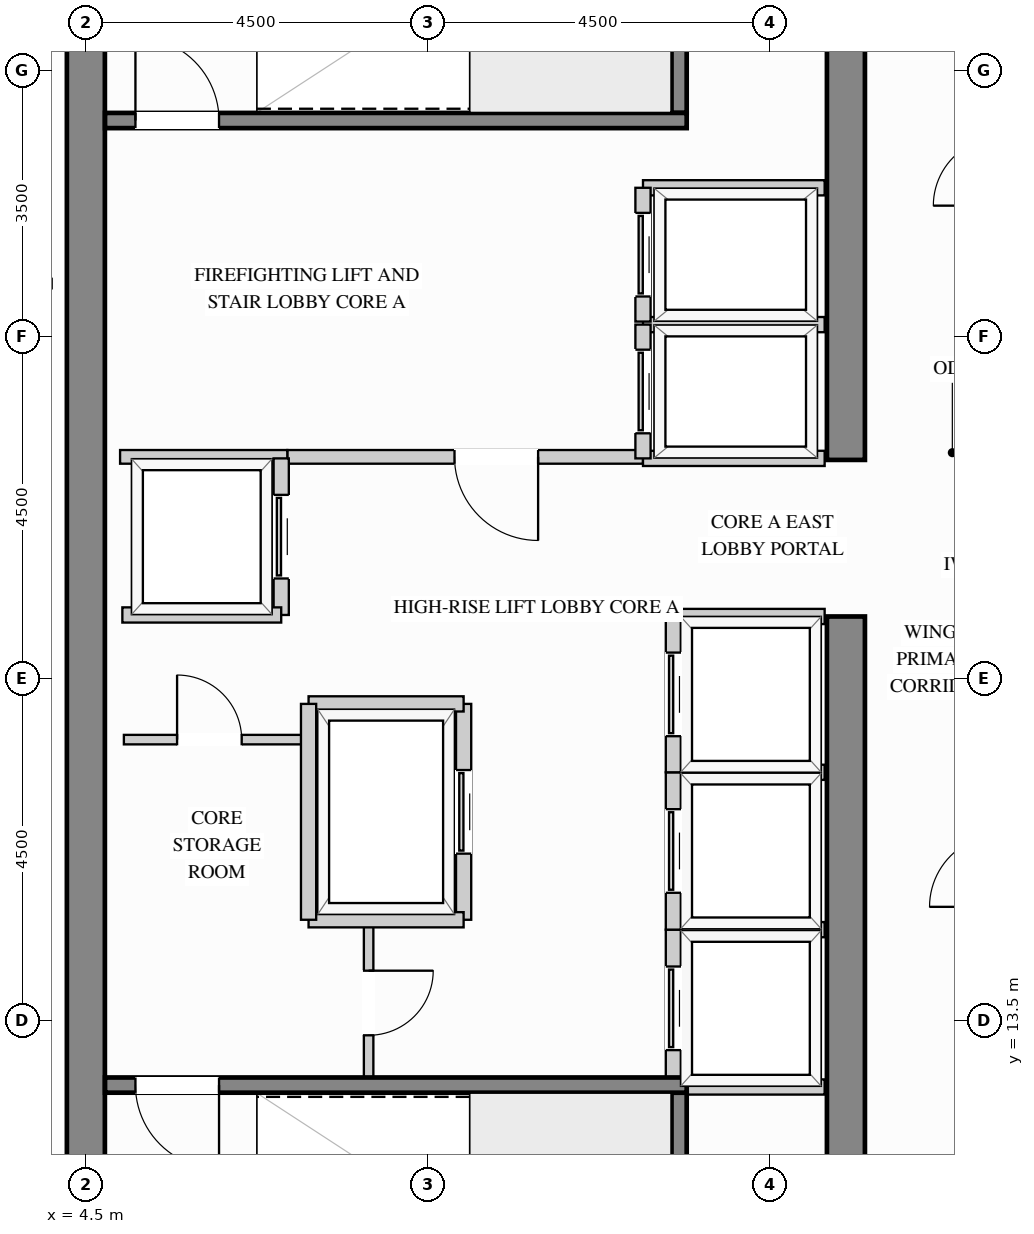
"""IFC4 building model, lengths in metres.
Left out: names, types, materials, properties, quantities, classifications, styles, units other than length and angle.
Written with IfcOpenShell. Run it as: python <this file> out.ifc"""

import sys

from ifc_helpers import new_model, si_unit, direction, frame, frame_2d, origin, place, context, subcontext, project, spatial, rectangle, extrude, source, transform, mapped, element, fill, save


model = new_model("IFC4")
c1 = context("Model", 3, precision=1e-05, world=origin(), true_north=direction((0.0, 1.0)))
c2 = subcontext(c1, "Body", "Model", "MODEL_VIEW")
j1 = project(units=[si_unit("LENGTHUNIT", "METRE"), si_unit("PLANEANGLEUNIT", "RADIAN")], contexts=[c1])
p1 = place(None, origin())
s1 = spatial("IfcSite", under=j1, at=p1, CompositionType="ELEMENT")
p2 = place(p1, origin())
s2 = spatial("IfcBuilding", under=s1, at=p2, CompositionType="ELEMENT")
p3 = place(p2, frame((0.0, 0.0, 226.8)))
s3 = spatial("IfcBuildingStorey", under=s2, at=p3, CompositionType="ELEMENT", Elevation=226.8)
m1 = source(origin(), c2, "Body", "SweptSolid", [
    extrude(rectangle(XDim=10.07, YDim=0.5, at=frame_2d((5.035, 0.0))), origin(), (0.0, 0.0, 1.0), 3.4),
])
p4 = place(p3, frame((14.5, 8.75, 0.0), z_axis=(0.0, 0.0, 1.0), x_axis=(0.0, 1.0, 0.0)))
e1 = element("IfcWall", 1, at=p4, inside=s3, PredefinedType="SHEAR", context=c2, shape_type="MappedRepresentation", body=[
    mapped(m1, transform((0.0, 0.0, 0.0), x_axis=(1.0, 0.0, 0.0), y_axis=(0.0, 1.0, 0.0), z_axis=(0.0, 0.0, 1.0))),
])
m2 = source(origin(), c2, "Body", "SweptSolid", [
    extrude(rectangle(XDim=8.37, YDim=0.5, at=frame_2d((4.185, 0.0))), origin(), (0.0, 0.0, 1.0), 3.4),
])
p5 = place(p3, frame((14.5, 20.88, 0.0), z_axis=(0.0, 0.0, 1.0), x_axis=(0.0, 1.0, 0.0)))
e2 = element("IfcWall", 2, at=p5, inside=s3, PredefinedType="SHEAR", context=c2, shape_type="MappedRepresentation", body=[
    mapped(m2, transform((0.0, 0.0, 0.0), x_axis=(1.0, 0.0, 0.0), y_axis=(0.0, 1.0, 0.0), z_axis=(0.0, 0.0, 1.0))),
])
m3 = source(origin(), c2, "Body", "SweptSolid", [
    extrude(rectangle(XDim=20.5, YDim=0.5, at=frame_2d((10.25, 0.0))), origin(), (0.0, 0.0, 1.0), 3.4),
])
p6 = place(p3, frame((4.5, 8.75, 0.0), z_axis=(0.0, 0.0, 1.0), x_axis=(0.0, 1.0, 0.0)))
e3 = element("IfcWall", 3, at=p6, inside=s3, PredefinedType="SHEAR", context=c2, shape_type="MappedRepresentation", body=[
    mapped(m3, transform((0.0, 0.0, 0.0), x_axis=(1.0, 0.0, 0.0), y_axis=(0.0, 1.0, 0.0), z_axis=(0.0, 0.0, 1.0))),
])
p7 = place(p3, frame((7.15, 20.92, 0.0), z_axis=(0.0, 0.0, 1.0), x_axis=(1.0, 0.0, 0.0)))
e4 = element("IfcWall", 4, at=p7, inside=s3, PredefinedType="PARTITIONING", context=c2, shape_type="SweptSolid", body=[
    extrude(rectangle(XDim=4.68, YDim=0.18, at=frame_2d((2.34, 0.0))), origin(), (0.0, 0.0, 1.0), 3.385),
])
p8 = place(p7, frame((2.2, 0.0, 0.0)))
e5 = element("IfcOpeningElement", 5, at=p8, cuts=e4, PredefinedType="OPENING", context=c2, shape_type="SweptSolid", body=[
    extrude(rectangle(XDim=1.1, YDim=2.15, at=frame_2d((0.55, 1.075))), frame((0.0, 0.1, 0.0), z_axis=(0.0, -1.0, 0.0), x_axis=(1.0, 0.0, 0.0)), (0.0, 0.0, 1.0), 0.2),
])
m4 = source(origin(), c2, "Body", "SweptSolid", [
    extrude(rectangle(XDim=2.2, YDim=0.18, at=frame_2d((1.1, 0.0))), origin(), (0.0, 0.0, 1.0), 3.385),
])
p9 = place(p3, frame((4.95, 20.92, 0.0), z_axis=(0.0, 0.0, 1.0), x_axis=(1.0, 0.0, 0.0)))
e6 = element("IfcWall", 6, at=p9, inside=s3, PredefinedType="PARTITIONING", context=c2, shape_type="MappedRepresentation", body=[
    mapped(m4, transform((0.0, 0.0, 0.0), x_axis=(1.0, 0.0, 0.0), y_axis=(0.0, 1.0, 0.0), z_axis=(0.0, 0.0, 1.0))),
])
p10 = place(p3, frame((8.22, 12.75, 0.0), z_axis=(0.0, 0.0, 1.0), x_axis=(0.0, 1.0, 0.0)))
e7 = element("IfcWall", 7, at=p10, inside=s3, PredefinedType="PARTITIONING", context=c2, shape_type="SweptSolid", body=[
    extrude(rectangle(XDim=2.07, YDim=0.125, at=frame_2d((1.035, 0.0))), origin(), (0.0, 0.0, 1.0), 3.385),
])
p11 = place(p10, frame((0.56, 0.0, 0.0)))
e8 = element("IfcOpeningElement", 8, at=p11, cuts=e7, PredefinedType="OPENING", context=c2, shape_type="SweptSolid", body=[
    extrude(rectangle(XDim=0.85, YDim=2.1, at=frame_2d((0.425, 1.05))), frame((0.0, 0.073, 0.0), z_axis=(0.0, -1.0, 0.0), x_axis=(1.0, 0.0, 0.0)), (0.0, 0.0, 1.0), 0.145),
])
p12 = place(p3, frame((5.0, 17.2, 0.0), z_axis=(0.0, 0.0, 1.0), x_axis=(1.0, 0.0, 0.0)))
e9 = element("IfcWall", 9, at=p12, inside=s3, PredefinedType="PARTITIONING", context=c2, shape_type="SweptSolid", body=[
    extrude(rectangle(XDim=2.4, YDim=0.125, at=frame_2d((1.2, 0.0))), origin(), (0.0, 0.0, 1.0), 3.385),
])
p13 = place(p12, frame((0.7, 0.0, 0.0)))
e10 = element("IfcOpeningElement", 10, at=p13, cuts=e9, PredefinedType="OPENING", context=c2, shape_type="SweptSolid", body=[
    extrude(rectangle(XDim=0.85, YDim=2.1, at=frame_2d((0.425, 1.05))), frame((0.0, 0.073, 0.0), z_axis=(0.0, -1.0, 0.0), x_axis=(1.0, 0.0, 0.0)), (0.0, 0.0, 1.0), 0.145),
])
m5 = source(origin(), c2, "Body", "SweptSolid", [
    extrude(rectangle(XDim=3.698, YDim=0.125, at=frame_2d((1.849, 0.0))), origin(), (0.0, 0.0, 1.0), 3.385),
])
p14 = place(p3, frame((0.352, 23.2, 0.0), z_axis=(0.0, 0.0, 1.0), x_axis=(1.0, 0.0, 0.0)))
e11 = element("IfcWall", 11, at=p14, inside=s3, PredefinedType="PARTITIONING", context=c2, shape_type="MappedRepresentation", body=[
    mapped(m5, transform((0.0, 0.0, 0.0), x_axis=(1.0, 0.0, 0.0), y_axis=(0.0, 1.0, 0.0), z_axis=(0.0, 0.0, 1.0))),
])
m6 = source(origin(), c2, "Body", "SweptSolid", [
    extrude(rectangle(XDim=2.39, YDim=0.2, at=frame_2d((1.195, 0.0))), origin(), (0.0, 0.0, 1.0), 3.385),
])
for number, where, z_axis, x_axis in (
    (12, (11.83, 22.66, 0.0), (0.0, 0.0, 1.0), (1.0, 0.0, 0.0)),
    (13, (11.83, 20.9, 0.0), (0.0, 0.0, 1.0), (1.0, 0.0, 0.0)),
):
    element("IfcWall", number, at=place(p3, frame(where, z_axis=z_axis, x_axis=x_axis)), inside=s3, PredefinedType="PARTITIONING", context=c2, shape_type="MappedRepresentation", body=[
        mapped(m6, transform((0.0, 0.0, 0.0), x_axis=(1.0, 0.0, 0.0), y_axis=(0.0, 1.0, 0.0), z_axis=(0.0, 0.0, 1.0))),
    ])
p15 = place(p3, frame((11.83, 20.9, 0.0), z_axis=(0.0, 0.0, 1.0), x_axis=(0.0, 1.0, 0.0)))
e14 = element("IfcWall", 14, at=p15, inside=s3, PredefinedType="PARTITIONING", context=c2, shape_type="SweptSolid", body=[
    extrude(rectangle(XDim=1.76, YDim=0.2, at=frame_2d((0.88, 0.0))), origin(), (0.0, 0.0, 1.0), 3.385),
])
p16 = place(p15, frame((0.33, 0.0, 0.0)))
e15 = element("IfcOpeningElement", 15, at=p16, cuts=e14, PredefinedType="OPENING", context=c2, shape_type="SweptSolid", body=[
    extrude(rectangle(XDim=1.1, YDim=2.2, at=frame_2d((0.55, 1.1))), frame((0.0, 0.11, 0.0), z_axis=(0.0, -1.0, 0.0), x_axis=(1.0, 0.0, 0.0)), (0.0, 0.0, 1.0), 0.22),
])
p17 = place(p3, frame((11.83, 24.46, 0.0), z_axis=(0.0, 0.0, 1.0), x_axis=(1.0, 0.0, 0.0)))
e16 = element("IfcWall", 16, at=p17, inside=s3, PredefinedType="PARTITIONING", context=c2, shape_type="MappedRepresentation", body=[
    mapped(m6, transform((0.0, 0.0, 0.0), x_axis=(1.0, 0.0, 0.0), y_axis=(0.0, 1.0, 0.0), z_axis=(0.0, 0.0, 1.0))),
])
p18 = place(p3, frame((11.83, 22.7, 0.0), z_axis=(0.0, 0.0, 1.0), x_axis=(0.0, 1.0, 0.0)))
e17 = element("IfcWall", 17, at=p18, inside=s3, PredefinedType="PARTITIONING", context=c2, shape_type="SweptSolid", body=[
    extrude(rectangle(XDim=1.76, YDim=0.2, at=frame_2d((0.88, 0.0))), origin(), (0.0, 0.0, 1.0), 3.385),
])
p19 = place(p18, frame((0.33, 0.0, 0.0)))
e18 = element("IfcOpeningElement", 18, at=p19, cuts=e17, PredefinedType="OPENING", context=c2, shape_type="SweptSolid", body=[
    extrude(rectangle(XDim=1.1, YDim=2.2, at=frame_2d((0.55, 1.1))), frame((0.0, 0.11, 0.0), z_axis=(0.0, -1.0, 0.0), x_axis=(1.0, 0.0, 0.0)), (0.0, 0.0, 1.0), 0.22),
])
m7 = source(origin(), c2, "Body", "SweptSolid", [
    extrude(rectangle(XDim=1.99, YDim=0.2, at=frame_2d((0.995, 0.0))), origin(), (0.0, 0.0, 1.0), 3.385),
])
for number, where, z_axis, x_axis in (
    (19, (12.23, 14.7, 0.0), (0.0, 0.0, 1.0), (1.0, 0.0, 0.0)),
    (20, (12.23, 12.63, 0.0), (0.0, 0.0, 1.0), (1.0, 0.0, 0.0)),
):
    element("IfcWall", number, at=place(p3, frame(where, z_axis=z_axis, x_axis=x_axis)), inside=s3, PredefinedType="PARTITIONING", context=c2, shape_type="MappedRepresentation", body=[
        mapped(m7, transform((0.0, 0.0, 0.0), x_axis=(1.0, 0.0, 0.0), y_axis=(0.0, 1.0, 0.0), z_axis=(0.0, 0.0, 1.0))),
    ])
p20 = place(p3, frame((12.23, 12.63, 0.0), z_axis=(0.0, 0.0, 1.0), x_axis=(0.0, 1.0, 0.0)))
e21 = element("IfcWall", 21, at=p20, inside=s3, PredefinedType="PARTITIONING", context=c2, shape_type="SweptSolid", body=[
    extrude(rectangle(XDim=2.07, YDim=0.2, at=frame_2d((1.035, 0.0))), origin(), (0.0, 0.0, 1.0), 3.385),
])
p21 = place(p20, frame((0.485, 0.0, 0.0)))
e22 = element("IfcOpeningElement", 22, at=p21, cuts=e21, PredefinedType="OPENING", context=c2, shape_type="SweptSolid", body=[
    extrude(rectangle(XDim=1.1, YDim=2.2, at=frame_2d((0.55, 1.1))), frame((0.0, 0.11, 0.0), z_axis=(0.0, -1.0, 0.0), x_axis=(1.0, 0.0, 0.0)), (0.0, 0.0, 1.0), 0.22),
])
p22 = place(p3, frame((12.23, 16.77, 0.0), z_axis=(0.0, 0.0, 1.0), x_axis=(1.0, 0.0, 0.0)))
e23 = element("IfcWall", 23, at=p22, inside=s3, PredefinedType="PARTITIONING", context=c2, shape_type="MappedRepresentation", body=[
    mapped(m7, transform((0.0, 0.0, 0.0), x_axis=(1.0, 0.0, 0.0), y_axis=(0.0, 1.0, 0.0), z_axis=(0.0, 0.0, 1.0))),
])
p23 = place(p3, frame((12.23, 14.7, 0.0), z_axis=(0.0, 0.0, 1.0), x_axis=(0.0, 1.0, 0.0)))
e24 = element("IfcWall", 24, at=p23, inside=s3, PredefinedType="PARTITIONING", context=c2, shape_type="SweptSolid", body=[
    extrude(rectangle(XDim=2.07, YDim=0.2, at=frame_2d((1.035, 0.0))), origin(), (0.0, 0.0, 1.0), 3.385),
])
p24 = place(p23, frame((0.485, 0.0, 0.0)))
e25 = element("IfcOpeningElement", 25, at=p24, cuts=e24, PredefinedType="OPENING", context=c2, shape_type="SweptSolid", body=[
    extrude(rectangle(XDim=1.1, YDim=2.2, at=frame_2d((0.55, 1.1))), frame((0.0, 0.11, 0.0), z_axis=(0.0, -1.0, 0.0), x_axis=(1.0, 0.0, 0.0)), (0.0, 0.0, 1.0), 0.22),
])
p25 = place(p3, frame((12.23, 18.82, 0.0), z_axis=(0.0, 0.0, 1.0), x_axis=(1.0, 0.0, 0.0)))
e26 = element("IfcWall", 26, at=p25, inside=s3, PredefinedType="PARTITIONING", context=c2, shape_type="MappedRepresentation", body=[
    mapped(m7, transform((0.0, 0.0, 0.0), x_axis=(1.0, 0.0, 0.0), y_axis=(0.0, 1.0, 0.0), z_axis=(0.0, 0.0, 1.0))),
])
p26 = place(p3, frame((12.23, 16.77, 0.0), z_axis=(0.0, 0.0, 1.0), x_axis=(0.0, 1.0, 0.0)))
e27 = element("IfcWall", 27, at=p26, inside=s3, PredefinedType="PARTITIONING", context=c2, shape_type="SweptSolid", body=[
    extrude(rectangle(XDim=2.05, YDim=0.2, at=frame_2d((1.025, 0.0))), origin(), (0.0, 0.0, 1.0), 3.385),
])
p27 = place(p26, frame((0.475, 0.0, 0.0)))
e28 = element("IfcOpeningElement", 28, at=p27, cuts=e27, PredefinedType="OPENING", context=c2, shape_type="SweptSolid", body=[
    extrude(rectangle(XDim=1.1, YDim=2.2, at=frame_2d((0.55, 1.1))), frame((0.0, 0.11, 0.0), z_axis=(0.0, -1.0, 0.0), x_axis=(1.0, 0.0, 0.0)), (0.0, 0.0, 1.0), 0.22),
])
p28 = place(p3, frame((7.07, 18.84, 0.0), z_axis=(0.0, 0.0, 1.0), x_axis=(0.0, 1.0, 0.0)))
e29 = element("IfcWall", 29, at=p28, inside=s3, PredefinedType="PARTITIONING", context=c2, shape_type="SweptSolid", body=[
    extrude(rectangle(XDim=2.06, YDim=0.2, at=frame_2d((1.03, 0.0))), origin(), (0.0, 0.0, 1.0), 3.385),
])
p29 = place(p28, frame((0.48, 0.0, 0.0)))
e30 = element("IfcOpeningElement", 30, at=p29, cuts=e29, PredefinedType="OPENING", context=c2, shape_type="SweptSolid", body=[
    extrude(rectangle(XDim=1.1, YDim=2.2, at=frame_2d((0.55, 1.1))), frame((0.0, 0.11, 0.0), z_axis=(0.0, -1.0, 0.0), x_axis=(1.0, 0.0, 0.0)), (0.0, 0.0, 1.0), 0.22),
])
m8 = source(origin(), c2, "Body", "SweptSolid", [
    extrude(rectangle(XDim=2.09, YDim=0.2, at=frame_2d((1.045, 0.0))), origin(), (0.0, 0.0, 1.0), 3.385),
])
p30 = place(p3, frame((4.98, 18.84, 0.0), z_axis=(0.0, 0.0, 1.0), x_axis=(1.0, 0.0, 0.0)))
e31 = element("IfcWall", 31, at=p30, inside=s3, PredefinedType="PARTITIONING", context=c2, shape_type="MappedRepresentation", body=[
    mapped(m8, transform((0.0, 0.0, 0.0), x_axis=(1.0, 0.0, 0.0), y_axis=(0.0, 1.0, 0.0), z_axis=(0.0, 0.0, 1.0))),
])
p31 = place(p3, frame((9.47, 14.83, 0.0), z_axis=(0.0, 0.0, 1.0), x_axis=(0.0, 1.0, 0.0)))
e32 = element("IfcWall", 32, at=p31, inside=s3, PredefinedType="PARTITIONING", context=c2, shape_type="SweptSolid", body=[
    extrude(rectangle(XDim=2.84, YDim=0.2, at=frame_2d((1.42, 0.0))), origin(), (0.0, 0.0, 1.0), 3.385),
])
p32 = place(p31, frame((0.87, 0.0, 0.0)))
e33 = element("IfcOpeningElement", 33, at=p32, cuts=e32, PredefinedType="OPENING", context=c2, shape_type="SweptSolid", body=[
    extrude(rectangle(XDim=1.1, YDim=2.2, at=frame_2d((0.55, 1.1))), frame((0.0, 0.11, 0.0), z_axis=(0.0, -1.0, 0.0), x_axis=(1.0, 0.0, 0.0)), (0.0, 0.0, 1.0), 0.22),
])
m9 = source(origin(), c2, "Body", "SweptSolid", [
    extrude(rectangle(XDim=2.04, YDim=0.2, at=frame_2d((1.02, 0.0))), origin(), (0.0, 0.0, 1.0), 3.385),
])
for number, where, z_axis, x_axis in (
    (34, (7.43, 17.67, 0.0), (0.0, 0.0, 1.0), (1.0, 0.0, 0.0)),
    (35, (7.43, 14.83, 0.0), (0.0, 0.0, 1.0), (1.0, 0.0, 0.0)),
):
    element("IfcWall", number, at=place(p3, frame(where, z_axis=z_axis, x_axis=x_axis)), inside=s3, PredefinedType="PARTITIONING", context=c2, shape_type="MappedRepresentation", body=[
        mapped(m9, transform((0.0, 0.0, 0.0), x_axis=(1.0, 0.0, 0.0), y_axis=(0.0, 1.0, 0.0), z_axis=(0.0, 0.0, 1.0))),
    ])
m10 = source(origin(), c2, "Body", "SweptSolid", [
    extrude(rectangle(XDim=2.84, YDim=0.2, at=frame_2d((1.42, 0.0))), origin(), (0.0, 0.0, 1.0), 3.385),
])
p33 = place(p3, frame((7.43, 14.83, 0.0), z_axis=(0.0, 0.0, 1.0), x_axis=(0.0, 1.0, 0.0)))
e36 = element("IfcWall", 36, at=p33, inside=s3, PredefinedType="PARTITIONING", context=c2, shape_type="MappedRepresentation", body=[
    mapped(m10, transform((0.0, 0.0, 0.0), x_axis=(1.0, 0.0, 0.0), y_axis=(0.0, 1.0, 0.0), z_axis=(0.0, 0.0, 1.0))),
])
m11 = source(origin(), c2, "Body", "SweptSolid", [
    extrude(rectangle(XDim=3.803, YDim=0.2, at=frame_2d((1.901, 0.0))), origin(), (0.0, 0.0, 1.0), 3.4),
])
p34 = place(p3, frame((12.305, 8.752, 0.0), z_axis=(0.0, 0.0, 1.0), x_axis=(0.0, 1.0, 0.0)))
e37 = element("IfcWall", 37, at=p34, inside=s3, PredefinedType="SHEAR", context=c2, shape_type="MappedRepresentation", body=[
    mapped(m11, transform((0.0, 0.0, 0.0), x_axis=(1.0, 0.0, 0.0), y_axis=(0.0, 1.0, 0.0), z_axis=(0.0, 0.0, 1.0))),
])
p35 = place(p3, frame((4.752, 12.655, 0.0), z_axis=(0.0, 0.0, 1.0), x_axis=(1.0, 0.0, 0.0)))
e38 = element("IfcWall", 38, at=p35, inside=s3, PredefinedType="SHEAR", context=c2, shape_type="SweptSolid", body=[
    extrude(rectangle(XDim=7.653, YDim=0.2, at=frame_2d((3.827, 0.0))), origin(), (0.0, 0.0, 1.0), 3.4),
])
p36 = place(p35, frame((0.4, 0.0, 0.0)))
e39 = element("IfcOpeningElement", 39, at=p36, cuts=e38, PredefinedType="OPENING", context=c2, shape_type="SweptSolid", body=[
    extrude(rectangle(XDim=1.1, YDim=2.15, at=frame_2d((0.55, 1.075))), frame((0.0, 0.11, 0.0), z_axis=(0.0, -1.0, 0.0), x_axis=(1.0, 0.0, 0.0)), (0.0, 0.0, 1.0), 0.22),
])
p37 = place(p3, frame((12.305, 25.445, 0.0), z_axis=(0.0, 0.0, 1.0), x_axis=(0.0, 1.0, 0.0)))
e40 = element("IfcWall", 40, at=p37, inside=s3, PredefinedType="SHEAR", context=c2, shape_type="MappedRepresentation", body=[
    mapped(m11, transform((0.0, 0.0, 0.0), x_axis=(1.0, 0.0, 0.0), y_axis=(0.0, 1.0, 0.0), z_axis=(0.0, 0.0, 1.0))),
])
p38 = place(p3, frame((4.752, 25.345, 0.0), z_axis=(0.0, 0.0, 1.0), x_axis=(1.0, 0.0, 0.0)))
e41 = element("IfcWall", 41, at=p38, inside=s3, PredefinedType="SHEAR", context=c2, shape_type="SweptSolid", body=[
    extrude(rectangle(XDim=7.653, YDim=0.2, at=frame_2d((3.827, 0.0))), origin(), (0.0, 0.0, 1.0), 3.4),
])
p39 = place(p38, frame((0.4, 0.0, 0.0)))
e42 = element("IfcOpeningElement", 42, at=p39, cuts=e41, PredefinedType="OPENING", context=c2, shape_type="SweptSolid", body=[
    extrude(rectangle(XDim=1.1, YDim=2.15, at=frame_2d((0.55, 1.075))), frame((0.0, 0.11, 0.0), z_axis=(0.0, -1.0, 0.0), x_axis=(1.0, 0.0, 0.0)), (0.0, 0.0, 1.0), 0.22),
])
m12 = source(origin(), c2, "Body", "SweptSolid", [
    extrude(rectangle(XDim=1.1, YDim=2.15, at=frame_2d((0.55, 1.075))), frame((0.0, 0.025, 0.0), z_axis=(0.0, -1.0, 0.0), x_axis=(1.0, 0.0, 0.0)), (0.0, 0.0, 1.0), 0.05),
])
p40 = place(p8, origin())
e43 = element("IfcDoor", 43, at=p40, inside=s3, OperationType="SINGLE_SWING_RIGHT", PredefinedType="DOOR", context=c2, shape_type="MappedRepresentation", body=[
    mapped(m12, transform((0.0, 0.0, 0.0), x_axis=(1.0, 0.0, 0.0), y_axis=(0.0, 1.0, 0.0), z_axis=(0.0, 0.0, 1.0))),
])
fill(e5, e43)
m13 = source(origin(), c2, "Body", "SweptSolid", [
    extrude(rectangle(XDim=1.1, YDim=2.2, at=frame_2d((0.55, 1.1))), frame((0.0, 0.025, 0.0), z_axis=(0.0, -1.0, 0.0), x_axis=(1.0, 0.0, 0.0)), (0.0, 0.0, 1.0), 0.05),
])
p41 = place(p16, origin())
e44 = element("IfcDoor", 44, at=p41, inside=s3, OperationType="SLIDING_TO_LEFT", PredefinedType="DOOR", context=c2, shape_type="MappedRepresentation", body=[
    mapped(m13, transform((0.0, 0.0, 0.0), x_axis=(1.0, 0.0, 0.0), y_axis=(0.0, 1.0, 0.0), z_axis=(0.0, 0.0, 1.0))),
])
fill(e15, e44)
p42 = place(p19, origin())
e45 = element("IfcDoor", 45, at=p42, inside=s3, OperationType="SLIDING_TO_LEFT", PredefinedType="DOOR", context=c2, shape_type="MappedRepresentation", body=[
    mapped(m13, transform((0.0, 0.0, 0.0), x_axis=(1.0, 0.0, 0.0), y_axis=(0.0, 1.0, 0.0), z_axis=(0.0, 0.0, 1.0))),
])
fill(e18, e45)
p43 = place(p21, origin())
e46 = element("IfcDoor", 46, at=p43, inside=s3, OperationType="SLIDING_TO_LEFT", PredefinedType="DOOR", context=c2, shape_type="MappedRepresentation", body=[
    mapped(m13, transform((0.0, 0.0, 0.0), x_axis=(1.0, 0.0, 0.0), y_axis=(0.0, 1.0, 0.0), z_axis=(0.0, 0.0, 1.0))),
])
fill(e22, e46)
p44 = place(p24, origin())
e47 = element("IfcDoor", 47, at=p44, inside=s3, OperationType="SLIDING_TO_LEFT", PredefinedType="DOOR", context=c2, shape_type="MappedRepresentation", body=[
    mapped(m13, transform((0.0, 0.0, 0.0), x_axis=(1.0, 0.0, 0.0), y_axis=(0.0, 1.0, 0.0), z_axis=(0.0, 0.0, 1.0))),
])
fill(e25, e47)
p45 = place(p27, origin())
e48 = element("IfcDoor", 48, at=p45, inside=s3, OperationType="SLIDING_TO_LEFT", PredefinedType="DOOR", context=c2, shape_type="MappedRepresentation", body=[
    mapped(m13, transform((0.0, 0.0, 0.0), x_axis=(1.0, 0.0, 0.0), y_axis=(0.0, 1.0, 0.0), z_axis=(0.0, 0.0, 1.0))),
])
fill(e28, e48)
p46 = place(p29, origin())
e49 = element("IfcDoor", 49, at=p46, inside=s3, OperationType="SLIDING_TO_LEFT", PredefinedType="DOOR", context=c2, shape_type="MappedRepresentation", body=[
    mapped(m13, transform((0.0, 0.0, 0.0), x_axis=(1.0, 0.0, 0.0), y_axis=(0.0, 1.0, 0.0), z_axis=(0.0, 0.0, 1.0))),
])
fill(e30, e49)
p47 = place(p32, origin())
e50 = element("IfcDoor", 50, at=p47, inside=s3, OperationType="SLIDING_TO_LEFT", PredefinedType="DOOR", context=c2, shape_type="MappedRepresentation", body=[
    mapped(m13, transform((0.0, 0.0, 0.0), x_axis=(1.0, 0.0, 0.0), y_axis=(0.0, 1.0, 0.0), z_axis=(0.0, 0.0, 1.0))),
])
fill(e33, e50)
m14 = source(origin(), c2, "Body", "SweptSolid", [
    extrude(rectangle(XDim=0.85, YDim=2.1, at=frame_2d((0.425, 1.05))), frame((0.0, 0.025, 0.0), z_axis=(0.0, -1.0, 0.0), x_axis=(1.0, 0.0, 0.0)), (0.0, 0.0, 1.0), 0.05),
])
p48 = place(p13, origin())
e51 = element("IfcDoor", 51, at=p48, inside=s3, OperationType="SINGLE_SWING_LEFT", PredefinedType="DOOR", context=c2, shape_type="MappedRepresentation", body=[
    mapped(m14, transform((0.0, 0.0, 0.0), x_axis=(1.0, 0.0, 0.0), y_axis=(0.0, 1.0, 0.0), z_axis=(0.0, 0.0, 1.0))),
])
fill(e10, e51)
p49 = place(p11, origin())
e52 = element("IfcDoor", 52, at=p49, inside=s3, OperationType="SINGLE_SWING_RIGHT", PredefinedType="DOOR", context=c2, shape_type="MappedRepresentation", body=[
    mapped(m14, transform((0.0, 0.0, 0.0), x_axis=(1.0, 0.0, 0.0), y_axis=(0.0, 1.0, 0.0), z_axis=(0.0, 0.0, 1.0))),
])
fill(e8, e52)
m15 = source(origin(), c2, "Body", "SweptSolid", [
    extrude(rectangle(XDim=1.1, YDim=2.15, at=frame_2d((0.55, 1.075))), frame((0.0, 0.025, 0.0), z_axis=(0.0, -1.0, 0.0), x_axis=(1.0, 0.0, 0.0)), (0.0, 0.0, 1.0), 0.05),
])
p50 = place(p36, origin())
e53 = element("IfcDoor", 53, at=p50, inside=s3, OperationType="SINGLE_SWING_RIGHT", PredefinedType="DOOR", context=c2, shape_type="MappedRepresentation", body=[
    mapped(m15, transform((0.0, 0.0, 0.0), x_axis=(1.0, 0.0, 0.0), y_axis=(0.0, 1.0, 0.0), z_axis=(0.0, 0.0, 1.0))),
])
fill(e39, e53)
p51 = place(p39, origin())
e54 = element("IfcDoor", 54, at=p51, inside=s3, OperationType="SINGLE_SWING_LEFT", PredefinedType="DOOR", context=c2, shape_type="MappedRepresentation", body=[
    mapped(m15, transform((0.0, 0.0, 0.0), x_axis=(1.0, 0.0, 0.0), y_axis=(0.0, 1.0, 0.0), z_axis=(0.0, 0.0, 1.0))),
])
fill(e42, e54)
save(model, sys.argv[1])
